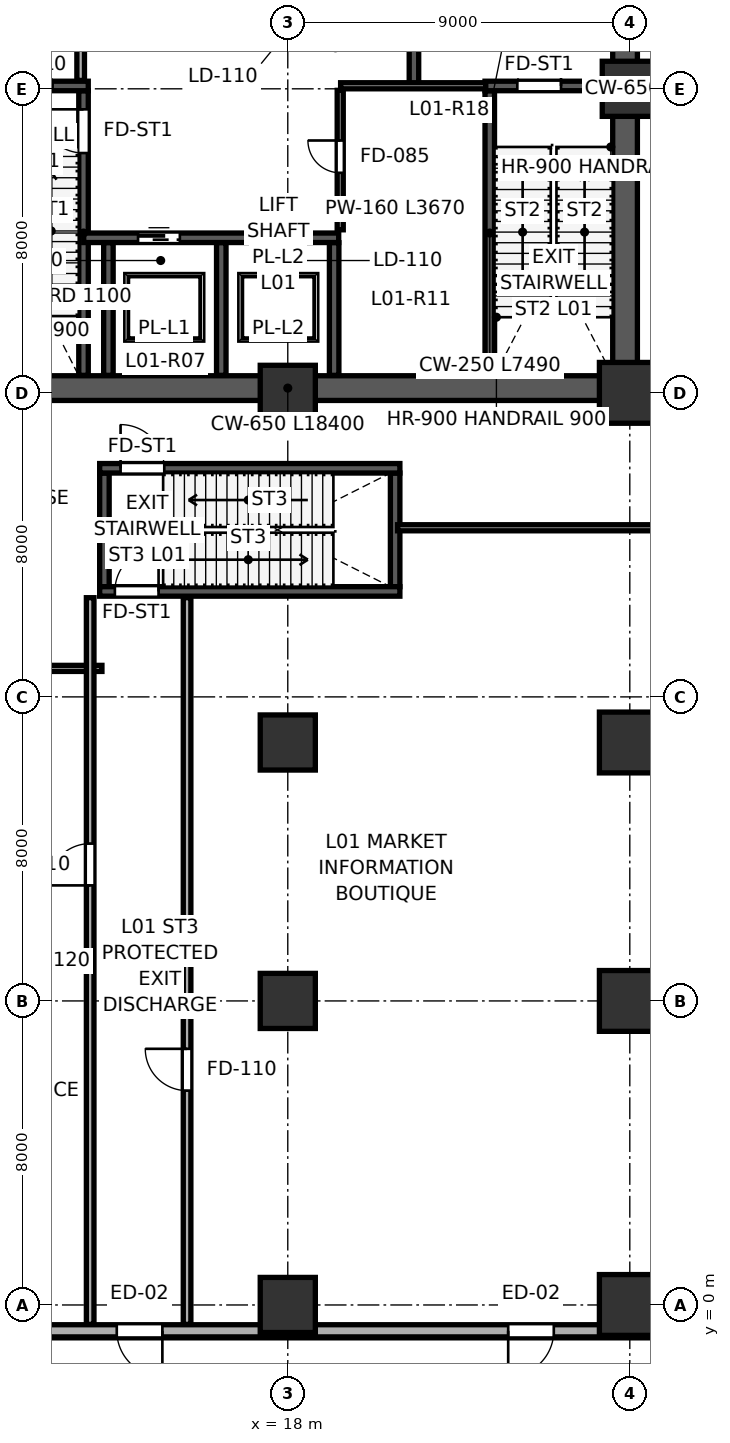
"""IFC4 building model, lengths in metres.
Left out: names, types, materials, properties, quantities, classifications, styles, units other than length and angle.
Written with IfcOpenShell. Run it as: python <this file> out.ifc"""

import sys

from ifc_helpers import new_model, si_unit, direction, frame, frame_2d, origin, origin_2d, place, context, subcontext, project, spatial, rectangle, extrude, source, transform, mapped, element, fill, save


model = new_model("IFC4")
c1 = context("Model", 3, precision=1e-05, world=origin(), true_north=direction((0.0, 1.0)))
c2 = subcontext(c1, "Body", "Model", "MODEL_VIEW")
j1 = project(units=[si_unit("LENGTHUNIT", "METRE"), si_unit("PLANEANGLEUNIT", "RADIAN")], contexts=[c1])
p1 = place(None, origin())
s1 = spatial("IfcSite", under=j1, at=p1, CompositionType="ELEMENT")
p2 = place(p1, origin())
s2 = spatial("IfcBuilding", under=s1, at=p2, CompositionType="ELEMENT")
p3 = place(p2, origin())
s3 = spatial("IfcBuildingStorey", under=s2, at=p3, CompositionType="ELEMENT", Elevation=0.0)
m1 = source(origin(), c2, "Body", "SweptSolid", [
    extrude(rectangle(XDim=1.45, YDim=1.45, at=origin_2d()), origin(), (0.0, 0.0, 1.0), 5.999),
])
p4 = place(p3, frame((18.0, 0.0, 0.001), z_axis=(0.0, 0.0, 1.0), x_axis=(1.0, 0.0, 0.0)))
e1 = element("IfcColumn", 1, at=p4, inside=s3, PredefinedType="COLUMN", context=c2, shape_type="MappedRepresentation", body=[
    mapped(m1, transform((0.0, 0.0, 0.0), scale=1.0)),
])
m2 = source(origin(), c2, "Body", "SweptSolid", [
    extrude(rectangle(XDim=1.45, YDim=1.45, at=origin_2d()), origin(), (0.0, 0.0, 1.0), 5.999),
])
p5 = place(p3, frame((18.0, 8.0, 0.001), z_axis=(0.0, 0.0, 1.0), x_axis=(1.0, 0.0, 0.0)))
e2 = element("IfcColumn", 2, at=p5, inside=s3, PredefinedType="COLUMN", context=c2, shape_type="MappedRepresentation", body=[
    mapped(m2, transform((0.0, 0.0, 0.0), scale=1.0)),
])
p6 = place(p3, frame((18.0, 24.0, 0.001), z_axis=(0.0, 0.0, 1.0), x_axis=(1.0, 0.0, 0.0)))
e3 = element("IfcColumn", 3, at=p6, inside=s3, PredefinedType="COLUMN", context=c2, shape_type="MappedRepresentation", body=[
    mapped(m1, transform((0.0, 0.0, 0.0), scale=1.0)),
])
p7 = place(p3, frame((18.0, 14.8, 0.001), z_axis=(0.0, 0.0, 1.0), x_axis=(1.0, 0.0, 0.0)))
e4 = element("IfcColumn", 4, at=p7, inside=s3, PredefinedType="COLUMN", context=c2, shape_type="MappedRepresentation", body=[
    mapped(m2, transform((0.0, 0.0, 0.0), scale=1.0)),
])
m3 = source(origin(), c2, "Body", "SweptSolid", [
    extrude(rectangle(XDim=1.6, YDim=1.6, at=origin_2d()), origin(), (0.0, 0.0, 1.0), 5.999),
])
p8 = place(p3, frame((27.0, 0.0, 0.001), z_axis=(0.0, 0.0, 1.0), x_axis=(1.0, 0.0, 0.0)))
e5 = element("IfcColumn", 5, at=p8, inside=s3, PredefinedType="COLUMN", context=c2, shape_type="MappedRepresentation", body=[
    mapped(m3, transform((0.0, 0.0, 0.0), scale=1.0)),
])
m4 = source(origin(), c2, "Body", "SweptSolid", [
    extrude(rectangle(XDim=1.6, YDim=1.6, at=origin_2d()), origin(), (0.0, 0.0, 1.0), 5.999),
])
p9 = place(p3, frame((27.0, 8.0, 0.001), z_axis=(0.0, 0.0, 1.0), x_axis=(1.0, 0.0, 0.0)))
e6 = element("IfcColumn", 6, at=p9, inside=s3, PredefinedType="COLUMN", context=c2, shape_type="MappedRepresentation", body=[
    mapped(m4, transform((0.0, 0.0, 0.0), scale=1.0)),
])
p10 = place(p3, frame((27.0, 24.0, 0.001), z_axis=(0.0, 0.0, 1.0), x_axis=(1.0, 0.0, 0.0)))
e7 = element("IfcColumn", 7, at=p10, inside=s3, PredefinedType="COLUMN", context=c2, shape_type="MappedRepresentation", body=[
    mapped(m3, transform((0.0, 0.0, 0.0), scale=1.0)),
])
p11 = place(p3, frame((27.0, 32.0, 0.001), z_axis=(0.0, 0.0, 1.0), x_axis=(1.0, 0.0, 0.0)))
e8 = element("IfcColumn", 8, at=p11, inside=s3, PredefinedType="COLUMN", context=c2, shape_type="MappedRepresentation", body=[
    mapped(m2, transform((0.0, 0.0, 0.0), scale=1.0)),
])
p12 = place(p3, frame((27.0, 14.8, 0.001), z_axis=(0.0, 0.0, 1.0), x_axis=(1.0, 0.0, 0.0)))
e9 = element("IfcColumn", 9, at=p12, inside=s3, PredefinedType="COLUMN", context=c2, shape_type="MappedRepresentation", body=[
    mapped(m4, transform((0.0, 0.0, 0.0), scale=1.0)),
])
p13 = place(p3, frame((44.4, -0.68, 0.0), z_axis=(0.0, 0.0, 1.0), x_axis=(-1.0, 0.0, 0.0)))
e10 = element("IfcWall", 10, at=p13, inside=s3, PredefinedType="SOLIDWALL", context=c2, shape_type="SweptSolid", body=[
    extrude(rectangle(XDim=40.8, YDim=0.32, at=frame_2d((20.4, 0.0))), origin(), (0.0, 0.0, 1.0), 5.74),
])
p14 = place(p13, frame((29.7, 0.0, 0.0)))
e11 = element("IfcOpeningElement", 11, at=p14, cuts=e10, PredefinedType="OPENING", context=c2, shape_type="SweptSolid", body=[
    extrude(rectangle(XDim=1.2, YDim=2.2, at=frame_2d((0.6, 1.1))), frame((0.0, 0.17, 0.0), z_axis=(0.0, -1.0, 0.0), x_axis=(1.0, 0.0, 0.0)), (0.0, 0.0, 1.0), 0.34),
])
p15 = place(p13, frame((19.4, 0.0, 0.0)))
e12 = element("IfcOpeningElement", 12, at=p15, cuts=e10, PredefinedType="OPENING", context=c2, shape_type="SweptSolid", body=[
    extrude(rectangle(XDim=1.2, YDim=2.2, at=frame_2d((0.6, 1.1))), frame((0.0, 0.17, 0.0), z_axis=(0.0, -1.0, 0.0), x_axis=(1.0, 0.0, 0.0)), (0.0, 0.0, 1.0), 0.34),
])
p16 = place(p3, frame((26.875, 24.45, 0.0), z_axis=(0.0, 0.0, 1.0), x_axis=(0.0, 1.0, 0.0)))
e13 = element("IfcWall", 13, at=p16, inside=s3, PredefinedType="SHEAR", context=c2, shape_type="SweptSolid", body=[
    extrude(rectangle(XDim=15.1, YDim=0.65, at=frame_2d((7.55, 0.0))), origin(), (0.0, 0.0, 1.0), 5.74),
])
p17 = place(p16, frame((8.6, 0.0, 0.0)))
e14 = element("IfcOpeningElement", 14, at=p17, cuts=e13, PredefinedType="OPENING", context=c2, shape_type="SweptSolid", body=[
    extrude(rectangle(XDim=1.15, YDim=2.2, at=frame_2d((0.575, 1.1))), frame((0.0, 0.335, 0.0), z_axis=(0.0, -1.0, 0.0), x_axis=(1.0, 0.0, 0.0)), (0.0, 0.0, 1.0), 0.67),
])
p18 = place(p3, frame((8.8, 24.125, 0.0), z_axis=(0.0, 0.0, 1.0), x_axis=(1.0, 0.0, 0.0)))
e15 = element("IfcWall", 15, at=p18, inside=s3, PredefinedType="SHEAR", context=c2, shape_type="SweptSolid", body=[
    extrude(rectangle(XDim=18.4, YDim=0.65, at=frame_2d((9.2, 0.0))), origin(), (0.0, 0.0, 1.0), 5.74),
])
p19 = place(p3, frame((12.625, 24.46, 0.0), z_axis=(0.0, 0.0, 1.0), x_axis=(0.0, 1.0, 0.0)))
e16 = element("IfcWall", 16, at=p19, inside=s3, PredefinedType="SHEAR", context=c2, shape_type="SweptSolid", body=[
    extrude(rectangle(XDim=7.49, YDim=0.25, at=frame_2d((3.745, 0.0))), origin(), (0.0, 0.0, 1.0), 5.74),
])
p20 = place(p19, frame((5.85, 0.0, 0.0)))
e17 = element("IfcOpeningElement", 17, at=p20, cuts=e16, PredefinedType="OPENING", context=c2, shape_type="SweptSolid", body=[
    extrude(rectangle(XDim=1.15, YDim=2.2, at=frame_2d((0.575, 1.1))), frame((0.0, 0.135, 0.0), z_axis=(0.0, -1.0, 0.0), x_axis=(1.0, 0.0, 0.0)), (0.0, 0.0, 1.0), 0.27),
])
p21 = place(p3, frame((9.46, 32.075, 0.0), z_axis=(0.0, 0.0, 1.0), x_axis=(1.0, 0.0, 0.0)))
e18 = element("IfcWall", 18, at=p21, inside=s3, PredefinedType="SHEAR", context=c2, shape_type="SweptSolid", body=[
    extrude(rectangle(XDim=3.29, YDim=0.25, at=frame_2d((1.645, 0.0))), origin(), (0.0, 0.0, 1.0), 5.74),
])
p22 = place(p21, frame((1.25, 0.0, 0.0)))
e19 = element("IfcOpeningElement", 19, at=p22, cuts=e18, PredefinedType="OPENING", context=c2, shape_type="SweptSolid", body=[
    extrude(rectangle(XDim=1.1, YDim=2.2, at=frame_2d((0.55, 1.1))), frame((0.0, 0.135, 0.0), z_axis=(0.0, -1.0, 0.0), x_axis=(1.0, 0.0, 0.0)), (0.0, 0.0, 1.0), 0.27),
])
p23 = place(p3, frame((23.315, 24.46, 0.0), z_axis=(0.0, 0.0, 1.0), x_axis=(0.0, 1.0, 0.0)))
e20 = element("IfcWall", 20, at=p23, inside=s3, PredefinedType="SHEAR", context=c2, shape_type="SweptSolid", body=[
    extrude(rectangle(XDim=7.49, YDim=0.25, at=frame_2d((3.745, 0.0))), origin(), (0.0, 0.0, 1.0), 5.74),
])
p24 = place(p3, frame((23.19, 32.075, 0.0), z_axis=(0.0, 0.0, 1.0), x_axis=(1.0, 0.0, 0.0)))
e21 = element("IfcWall", 21, at=p24, inside=s3, PredefinedType="SHEAR", context=c2, shape_type="SweptSolid", body=[
    extrude(rectangle(XDim=3.35, YDim=0.25, at=frame_2d((1.675, 0.0))), origin(), (0.0, 0.0, 1.0), 5.74),
])
p25 = place(p24, frame((0.85, 0.0, 0.0)))
e22 = element("IfcOpeningElement", 22, at=p25, cuts=e21, PredefinedType="OPENING", context=c2, shape_type="SweptSolid", body=[
    extrude(rectangle(XDim=1.15, YDim=2.2, at=frame_2d((0.575, 1.1))), frame((0.0, 0.135, 0.0), z_axis=(0.0, -1.0, 0.0), x_axis=(1.0, 0.0, 0.0)), (0.0, 0.0, 1.0), 0.27),
])
p26 = place(p3, frame((21.32, 32.12, 0.0), z_axis=(0.0, 0.0, 1.0), x_axis=(0.0, 1.0, 0.0)))
e23 = element("IfcWall", 23, at=p26, inside=s3, PredefinedType="SHEAR", context=c2, shape_type="SweptSolid", body=[
    extrude(rectangle(XDim=7.42, YDim=0.25, at=frame_2d((3.71, 0.0))), origin(), (0.0, 0.0, 1.0), 5.74),
])
p27 = place(p26, frame((1.4, 0.0, 0.0)))
e24 = element("IfcOpeningElement", 24, at=p27, cuts=e23, PredefinedType="OPENING", context=c2, shape_type="SweptSolid", body=[
    extrude(rectangle(XDim=1.15, YDim=2.2, at=frame_2d((0.575, 1.1))), frame((0.0, 0.135, 0.0), z_axis=(0.0, -1.0, 0.0), x_axis=(1.0, 0.0, 0.0)), (0.0, 0.0, 1.0), 0.27),
])
p28 = place(p3, frame((12.63, 28.08, 0.0), z_axis=(0.0, 0.0, 1.0), x_axis=(1.0, 0.0, 0.0)))
e25 = element("IfcWall", 25, at=p28, inside=s3, PredefinedType="SHEAR", context=c2, shape_type="SweptSolid", body=[
    extrude(rectangle(XDim=6.71, YDim=0.25, at=frame_2d((3.355, 0.0))), origin(), (0.0, 0.0, 1.0), 5.74),
])
p29 = place(p28, frame((1.43, 0.0, 0.0)))
e26 = element("IfcOpeningElement", 26, at=p29, cuts=e25, PredefinedType="OPENING", context=c2, shape_type="SweptSolid", body=[
    extrude(rectangle(XDim=1.1, YDim=2.2, at=frame_2d((0.55, 1.1))), frame((0.0, 0.135, 0.0), z_axis=(0.0, -1.0, 0.0), x_axis=(1.0, 0.0, 0.0)), (0.0, 0.0, 1.0), 0.27),
])
p30 = place(p28, frame((4.43, 0.0, 0.0)))
e27 = element("IfcOpeningElement", 27, at=p30, cuts=e25, PredefinedType="OPENING", context=c2, shape_type="SweptSolid", body=[
    extrude(rectangle(XDim=1.1, YDim=2.2, at=frame_2d((0.55, 1.1))), frame((0.0, 0.135, 0.0), z_axis=(0.0, -1.0, 0.0), x_axis=(1.0, 0.0, 0.0)), (0.0, 0.0, 1.0), 0.27),
])
for number, where, z_axis, x_axis in (
    (28, (13.28, 24.46, 0.0), (0.0, 0.0, 1.0), (0.0, 1.0, 0.0)),
    (29, (16.25, 24.46, 0.0), (0.0, 0.0, 1.0), (0.0, 1.0, 0.0)),
    (30, (19.22, 24.46, 0.0), (0.0, 0.0, 1.0), (0.0, 1.0, 0.0)),
):
    element("IfcWall", number, at=place(p3, frame(where, z_axis=z_axis, x_axis=x_axis)), inside=s3, PredefinedType="SHEAR", context=c2, shape_type="SweptSolid", body=[
        extrude(rectangle(XDim=3.49, YDim=0.25, at=frame_2d((1.745, 0.0))), origin(), (0.0, 0.0, 1.0), 5.74),
    ])
for number, where, z_axis, x_axis in (
    (31, (13.175, 18.9, 0.0), (0.0, 0.0, 1.0), (0.0, 1.0, 0.0)),
    (32, (20.825, 18.9, 0.0), (0.0, 0.0, 1.0), (0.0, 1.0, 0.0)),
):
    element("IfcWall", number, at=place(p3, frame(where, z_axis=z_axis, x_axis=x_axis)), inside=s3, PredefinedType="SHEAR", context=c2, shape_type="SweptSolid", body=[
        extrude(rectangle(XDim=2.99, YDim=0.25, at=frame_2d((1.495, 0.0))), origin(), (0.0, 0.0, 1.0), 5.74),
    ])
p31 = place(p3, frame((13.05, 18.775, 0.0), z_axis=(0.0, 0.0, 1.0), x_axis=(1.0, 0.0, 0.0)))
e33 = element("IfcWall", 33, at=p31, inside=s3, PredefinedType="SHEAR", context=c2, shape_type="SweptSolid", body=[
    extrude(rectangle(XDim=7.9, YDim=0.25, at=frame_2d((3.95, 0.0))), origin(), (0.0, 0.0, 1.0), 5.74),
])
p32 = place(p31, frame((0.4, 0.0, 0.0)))
e34 = element("IfcOpeningElement", 34, at=p32, cuts=e33, PredefinedType="OPENING", context=c2, shape_type="SweptSolid", body=[
    extrude(rectangle(XDim=1.15, YDim=2.2, at=frame_2d((0.575, 1.1))), frame((0.0, 0.135, 0.0), z_axis=(0.0, -1.0, 0.0), x_axis=(1.0, 0.0, 0.0)), (0.0, 0.0, 1.0), 0.27),
])
p33 = place(p3, frame((13.05, 22.015, 0.0), z_axis=(0.0, 0.0, 1.0), x_axis=(1.0, 0.0, 0.0)))
e35 = element("IfcWall", 35, at=p33, inside=s3, PredefinedType="SHEAR", context=c2, shape_type="SweptSolid", body=[
    extrude(rectangle(XDim=7.9, YDim=0.25, at=frame_2d((3.95, 0.0))), origin(), (0.0, 0.0, 1.0), 5.74),
])
p34 = place(p33, frame((0.55, 0.0, 0.0)))
e36 = element("IfcOpeningElement", 36, at=p34, cuts=e35, PredefinedType="OPENING", context=c2, shape_type="SweptSolid", body=[
    extrude(rectangle(XDim=1.15, YDim=2.2, at=frame_2d((0.575, 1.1))), frame((0.0, 0.135, 0.0), z_axis=(0.0, -1.0, 0.0), x_axis=(1.0, 0.0, 0.0)), (0.0, 0.0, 1.0), 0.27),
])
p35 = place(p3, frame((19.39, 32.08, 0.0), z_axis=(0.0, 0.0, 1.0), x_axis=(1.0, 0.0, 0.0)))
e37 = element("IfcWall", 37, at=p35, inside=s3, PredefinedType="PARTITIONING", context=c2, shape_type="SweptSolid", body=[
    extrude(rectangle(XDim=3.82, YDim=0.16, at=frame_2d((1.91, 0.0))), origin(), (0.0, 0.0, 1.0), 5.74),
])
p36 = place(p3, frame((19.38, 28.29, 0.0), z_axis=(0.0, 0.0, 1.0), x_axis=(0.0, 1.0, 0.0)))
e38 = element("IfcWall", 38, at=p36, inside=s3, PredefinedType="PARTITIONING", context=c2, shape_type="SweptSolid", body=[
    extrude(rectangle(XDim=3.67, YDim=0.16, at=frame_2d((1.835, 0.0))), origin(), (0.0, 0.0, 1.0), 5.74),
])
p37 = place(p36, frame((1.5, 0.0, 0.0)))
e39 = element("IfcOpeningElement", 39, at=p37, cuts=e38, PredefinedType="OPENING", context=c2, shape_type="SweptSolid", body=[
    extrude(rectangle(XDim=0.85, YDim=2.1, at=frame_2d((0.425, 1.05))), frame((0.0, 0.09, 0.0), z_axis=(0.0, -1.0, 0.0), x_axis=(1.0, 0.0, 0.0)), (0.0, 0.0, 1.0), 0.18),
])
p38 = place(p3, frame((-0.51, 16.75, 0.0), z_axis=(0.0, 0.0, 1.0), x_axis=(1.0, 0.0, 0.0)))
e40 = element("IfcWall", 40, at=p38, inside=s3, PredefinedType="PARTITIONING", context=c2, shape_type="SweptSolid", body=[
    extrude(rectangle(XDim=13.62, YDim=0.16, at=frame_2d((6.81, 0.0))), origin(), (0.0, 0.0, 1.0), 4.869),
])
p39 = place(p38, frame((7.2, 0.0, 0.0)))
e41 = element("IfcOpeningElement", 41, at=p39, cuts=e40, PredefinedType="OPENING", context=c2, shape_type="SweptSolid", body=[
    extrude(rectangle(XDim=1.1, YDim=2.2, at=frame_2d((0.55, 1.1))), frame((0.0, 0.09, 0.0), z_axis=(0.0, -1.0, 0.0), x_axis=(1.0, 0.0, 0.0)), (0.0, 0.0, 1.0), 0.18),
])
p40 = place(p3, frame((20.89, 20.45, 0.0), z_axis=(0.0, 0.0, 1.0), x_axis=(1.0, 0.0, 0.0)))
e42 = element("IfcWall", 42, at=p40, inside=s3, PredefinedType="PARTITIONING", context=c2, shape_type="SweptSolid", body=[
    extrude(rectangle(XDim=27.07, YDim=0.16, at=frame_2d((13.535, 0.0))), origin(), (0.0, 0.0, 1.0), 4.869),
])
p41 = place(p40, frame((10.6, 0.0, 0.0)))
e43 = element("IfcOpeningElement", 43, at=p41, cuts=e42, PredefinedType="OPENING", context=c2, shape_type="SweptSolid", body=[
    extrude(rectangle(XDim=1.1, YDim=2.2, at=frame_2d((0.55, 1.1))), frame((0.0, 0.09, 0.0), z_axis=(0.0, -1.0, 0.0), x_axis=(1.0, 0.0, 0.0)), (0.0, 0.0, 1.0), 0.18),
])
p42 = place(p3, frame((12.55, 32.22, 0.0), z_axis=(0.0, 0.0, 1.0), x_axis=(0.0, 1.0, 0.0)))
e44 = element("IfcWall", 44, at=p42, inside=s3, PredefinedType="SOLIDWALL", context=c2, shape_type="SweptSolid", body=[
    extrude(rectangle(XDim=1.6, YDim=0.2, at=frame_2d((0.8, 0.0))), origin(), (0.0, 0.0, 1.0), 5.74),
])
p43 = place(p3, frame((12.8, -0.51, 0.0), z_axis=(0.0, 0.0, 1.0), x_axis=(0.0, 1.0, 0.0)))
e45 = element("IfcWall", 45, at=p43, inside=s3, PredefinedType="SOLIDWALL", context=c2, shape_type="SweptSolid", body=[
    extrude(rectangle(XDim=19.12, YDim=0.2, at=frame_2d((9.56, 0.0))), origin(), (0.0, 0.0, 1.0), 4.869),
])
p44 = place(p43, frame((11.55, 0.0, 0.0)))
e46 = element("IfcOpeningElement", 46, at=p44, cuts=e45, PredefinedType="OPENING", context=c2, shape_type="SweptSolid", body=[
    extrude(rectangle(XDim=1.1, YDim=2.2, at=frame_2d((0.55, 1.1))), frame((0.0, 0.11, 0.0), z_axis=(0.0, -1.0, 0.0), x_axis=(1.0, 0.0, 0.0)), (0.0, 0.0, 1.0), 0.22),
])
p45 = place(p3, frame((15.35, -0.51, 0.0), z_axis=(0.0, 0.0, 1.0), x_axis=(0.0, 1.0, 0.0)))
e47 = element("IfcWall", 47, at=p45, inside=s3, PredefinedType="SOLIDWALL", context=c2, shape_type="SweptSolid", body=[
    extrude(rectangle(XDim=19.12, YDim=0.2, at=frame_2d((9.56, 0.0))), origin(), (0.0, 0.0, 1.0), 4.869),
])
p46 = place(p45, frame((6.15, 0.0, 0.0)))
e48 = element("IfcOpeningElement", 48, at=p46, cuts=e47, PredefinedType="OPENING", context=c2, shape_type="SweptSolid", body=[
    extrude(rectangle(XDim=1.1, YDim=2.2, at=frame_2d((0.55, 1.1))), frame((0.0, 0.11, 0.0), z_axis=(0.0, -1.0, 0.0), x_axis=(1.0, 0.0, 0.0)), (0.0, 0.0, 1.0), 0.22),
])
m5 = source(origin(), c2, "Body", "SweptSolid", [
    extrude(rectangle(XDim=1.2, YDim=2.2, at=frame_2d((0.6, 1.1))), frame((0.0, 0.025, 0.0), z_axis=(0.0, -1.0, 0.0), x_axis=(1.0, 0.0, 0.0)), (0.0, 0.0, 1.0), 0.05),
])
p47 = place(p14, origin())
e49 = element("IfcDoor", 49, at=p47, inside=s3, OperationType="SINGLE_SWING_LEFT", PredefinedType="DOOR", context=c2, shape_type="MappedRepresentation", body=[
    mapped(m5, transform((0.0, 0.0, 0.0), scale=1.0)),
])
fill(e11, e49)
p48 = place(p15, origin())
e50 = element("IfcDoor", 50, at=p48, inside=s3, OperationType="SINGLE_SWING_RIGHT", PredefinedType="DOOR", context=c2, shape_type="MappedRepresentation", body=[
    mapped(m5, transform((0.0, 0.0, 0.0), scale=1.0)),
])
fill(e12, e50)
m6 = source(origin(), c2, "Body", "SweptSolid", [
    extrude(rectangle(XDim=1.15, YDim=2.2, at=frame_2d((0.575, 1.1))), frame((0.0, 0.025, 0.0), z_axis=(0.0, -1.0, 0.0), x_axis=(1.0, 0.0, 0.0)), (0.0, 0.0, 1.0), 0.05),
])
p49 = place(p20, origin())
e51 = element("IfcDoor", 51, at=p49, inside=s3, OperationType="SINGLE_SWING_RIGHT", PredefinedType="DOOR", context=c2, shape_type="MappedRepresentation", body=[
    mapped(m6, transform((0.0, 0.0, 0.0), scale=1.0)),
])
fill(e17, e51)
p50 = place(p25, origin())
e52 = element("IfcDoor", 52, at=p50, inside=s3, OperationType="SINGLE_SWING_RIGHT", PredefinedType="DOOR", context=c2, shape_type="MappedRepresentation", body=[
    mapped(m6, transform((0.0, 0.0, 0.0), scale=1.0)),
])
fill(e22, e52)
p51 = place(p34, origin())
e53 = element("IfcDoor", 53, at=p51, inside=s3, OperationType="SINGLE_SWING_LEFT", PredefinedType="DOOR", context=c2, shape_type="MappedRepresentation", body=[
    mapped(m6, transform((0.0, 0.0, 0.0), scale=1.0)),
])
fill(e36, e53)
m7 = source(origin(), c2, "Body", "SweptSolid", [
    extrude(rectangle(XDim=1.1, YDim=2.2, at=frame_2d((0.55, 1.1))), frame((0.0, 0.025, 0.0), z_axis=(0.0, -1.0, 0.0), x_axis=(1.0, 0.0, 0.0)), (0.0, 0.0, 1.0), 0.05),
])
p52 = place(p22, origin())
e54 = element("IfcDoor", 54, at=p52, inside=s3, OperationType="SINGLE_SWING_LEFT", PredefinedType="DOOR", context=c2, shape_type="MappedRepresentation", body=[
    mapped(m7, transform((0.0, 0.0, 0.0), scale=1.0)),
])
fill(e19, e54)
p53 = place(p32, origin())
e55 = element("IfcDoor", 55, at=p53, inside=s3, OperationType="SINGLE_SWING_RIGHT", PredefinedType="DOOR", context=c2, shape_type="MappedRepresentation", body=[
    mapped(m6, transform((0.0, 0.0, 0.0), scale=1.0)),
])
fill(e34, e55)
m8 = source(origin(), c2, "Body", "SweptSolid", [
    extrude(rectangle(XDim=1.1, YDim=2.2, at=frame_2d((0.55, 1.1))), frame((0.0, 0.025, 0.0), z_axis=(0.0, -1.0, 0.0), x_axis=(1.0, 0.0, 0.0)), (0.0, 0.0, 1.0), 0.05),
])
p54 = place(p29, origin())
e56 = element("IfcDoor", 56, at=p54, inside=s3, OperationType="SLIDING_TO_LEFT", PredefinedType="DOOR", context=c2, shape_type="MappedRepresentation", body=[
    mapped(m8, transform((0.0, 0.0, 0.0), scale=1.0)),
])
fill(e26, e56)
p55 = place(p30, origin())
e57 = element("IfcDoor", 57, at=p55, inside=s3, OperationType="SLIDING_TO_RIGHT", PredefinedType="DOOR", context=c2, shape_type="MappedRepresentation", body=[
    mapped(m8, transform((0.0, 0.0, 0.0), scale=1.0)),
])
fill(e27, e57)
m9 = source(origin(), c2, "Body", "SweptSolid", [
    extrude(rectangle(XDim=0.85, YDim=2.1, at=frame_2d((0.425, 1.05))), frame((0.0, 0.025, 0.0), z_axis=(0.0, -1.0, 0.0), x_axis=(1.0, 0.0, 0.0)), (0.0, 0.0, 1.0), 0.05),
])
p56 = place(p37, origin())
e58 = element("IfcDoor", 58, at=p56, inside=s3, OperationType="SINGLE_SWING_RIGHT", PredefinedType="DOOR", context=c2, shape_type="MappedRepresentation", body=[
    mapped(m9, transform((0.0, 0.0, 0.0), scale=1.0)),
])
fill(e39, e58)
p57 = place(p44, origin())
e59 = element("IfcDoor", 59, at=p57, inside=s3, OperationType="SINGLE_SWING_LEFT", PredefinedType="DOOR", context=c2, shape_type="MappedRepresentation", body=[
    mapped(m7, transform((0.0, 0.0, 0.0), scale=1.0)),
])
fill(e46, e59)
p58 = place(p46, origin())
e60 = element("IfcDoor", 60, at=p58, inside=s3, OperationType="SINGLE_SWING_RIGHT", PredefinedType="DOOR", context=c2, shape_type="MappedRepresentation", body=[
    mapped(m7, transform((0.0, 0.0, 0.0), scale=1.0)),
])
fill(e48, e60)
save(model, sys.argv[1])
